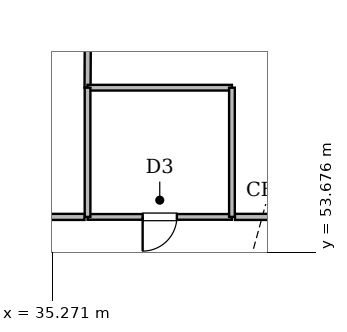
"""IFC4 building model, lengths in metres.
Left out: names, types, materials, properties, quantities, classifications, styles, units other than length and angle.
Written with IfcOpenShell. Run it as: python <this file> out.ifc"""

import sys

from ifc_helpers import new_model, si_unit, direction, frame, frame_2d, origin, place, context, subcontext, project, spatial, rectangle, extrude, element, fill, save


model = new_model("IFC4")
c1 = context("Model", 3, precision=1e-05, world=origin(), true_north=direction((0.0, 1.0)))
c2 = subcontext(c1, "Body", "Model", "MODEL_VIEW")
j1 = project(units=[si_unit("LENGTHUNIT", "METRE"), si_unit("PLANEANGLEUNIT", "RADIAN")], contexts=[c1])
p1 = place(None, origin())
s1 = spatial("IfcSite", under=j1, at=p1, CompositionType="ELEMENT")
p2 = place(p1, origin())
s2 = spatial("IfcBuilding", under=s1, at=p2, CompositionType="ELEMENT")
p3 = place(p2, frame((0.0, 0.0, 14.4)))
s3 = spatial("IfcBuildingStorey", under=s2, at=p3, CompositionType="ELEMENT", Elevation=14.4)
p4 = place(p3, frame((40.0, 54.6, 0.0), z_axis=(0.0, 0.0, 1.0), x_axis=(-1.0, 0.0, 0.0)))
e1 = element("IfcWall", 1, at=p4, inside=s3, PredefinedType="PLUMBINGWALL", context=c2, shape_type="SweptSolid", body=[
    extrude(rectangle(XDim=3.8, YDim=0.15, at=frame_2d((1.9, 0.0))), origin(), (0.0, 0.0, 1.0), 3.688),
])
p5 = place(p4, frame((1.45, 0.0, 0.0)))
e2 = element("IfcOpeningElement", 2, at=p5, cuts=e1, PredefinedType="OPENING", context=c2, shape_type="SweptSolid", body=[
    extrude(rectangle(XDim=0.9, YDim=2.1, at=frame_2d((0.45, 1.05))), frame((0.0, 0.085, 0.0), z_axis=(0.0, -1.0, 0.0), x_axis=(1.0, 0.0, 0.0)), (0.0, 0.0, 1.0), 0.17),
])
p6 = place(p3, frame((36.2, 58.0, 0.0), z_axis=(0.0, 0.0, 1.0), x_axis=(0.005266696555, 0.999986130858, 0.0)))
e3 = element("IfcWall", 3, at=p6, inside=s3, PredefinedType="SOLIDWALL", context=c2, shape_type="SweptSolid", body=[
    extrude(rectangle(XDim=14.231, YDim=0.16, at=frame_2d((7.116, 0.0))), origin(), (0.0, 0.0, 1.0), 3.788),
])
p7 = place(p3, frame((52.47, 54.6, 0.0), z_axis=(0.0, 0.0, 1.0), x_axis=(-1.0, 0.0, 0.0)))
e4 = element("IfcWall", 4, at=p7, inside=s3, PredefinedType="SOLIDWALL", context=c2, shape_type="SweptSolid", body=[
    extrude(rectangle(XDim=12.39, YDim=0.16, at=frame_2d((6.195, 0.0))), origin(), (0.0, 0.0, 1.0), 3.688),
])
p8 = place(p3, frame((40.0, 58.0, 0.0), z_axis=(0.0, 0.0, 1.0), x_axis=(-1.0, 0.0, 0.0)))
e5 = element("IfcWall", 5, at=p8, inside=s3, PredefinedType="PLUMBINGWALL", context=c2, shape_type="SweptSolid", body=[
    extrude(rectangle(XDim=3.8, YDim=0.15, at=frame_2d((1.9, 0.0))), origin(), (0.0, 0.0, 1.0), 4.5),
])
p9 = place(p3, frame((36.2, 58.0, 0.0), z_axis=(0.0, 0.0, 1.0), x_axis=(0.0, -1.0, 0.0)))
e6 = element("IfcWall", 6, at=p9, inside=s3, PredefinedType="PLUMBINGWALL", context=c2, shape_type="SweptSolid", body=[
    extrude(rectangle(XDim=3.4, YDim=0.15, at=frame_2d((1.7, 0.0))), origin(), (0.0, 0.0, 1.0), 4.5),
])
p10 = place(p3, frame((40.0, 54.6, 0.0), z_axis=(0.0, 0.0, 1.0), x_axis=(0.0, 1.0, 0.0)))
e7 = element("IfcWall", 7, at=p10, inside=s3, PredefinedType="PLUMBINGWALL", context=c2, shape_type="SweptSolid", body=[
    extrude(rectangle(XDim=3.4, YDim=0.15, at=frame_2d((1.7, 0.0))), origin(), (0.0, 0.0, 1.0), 3.688),
])
p11 = place(p3, frame((36.12, 54.6, 0.0), z_axis=(0.0, 0.0, 1.0), x_axis=(-1.0, 0.0, 0.0)))
e8 = element("IfcWall", 8, at=p11, inside=s3, PredefinedType="SOLIDWALL", context=c2, shape_type="SweptSolid", body=[
    extrude(rectangle(XDim=2.64, YDim=0.16, at=frame_2d((1.32, 0.0))), origin(), (0.0, 0.0, 1.0), 4.5),
])
p12 = place(p5, origin())
e9 = element("IfcDoor", 9, at=p12, inside=s3, OperationType="SINGLE_SWING_RIGHT", PredefinedType="DOOR", context=c2, shape_type="SweptSolid", body=[
    extrude(rectangle(XDim=0.9, YDim=2.1, at=frame_2d((0.45, 1.05))), frame((0.0, 0.025, 0.0), z_axis=(0.0, -1.0, 0.0), x_axis=(1.0, 0.0, 0.0)), (0.0, 0.0, 1.0), 0.05),
])
fill(e2, e9)
save(model, sys.argv[1])
